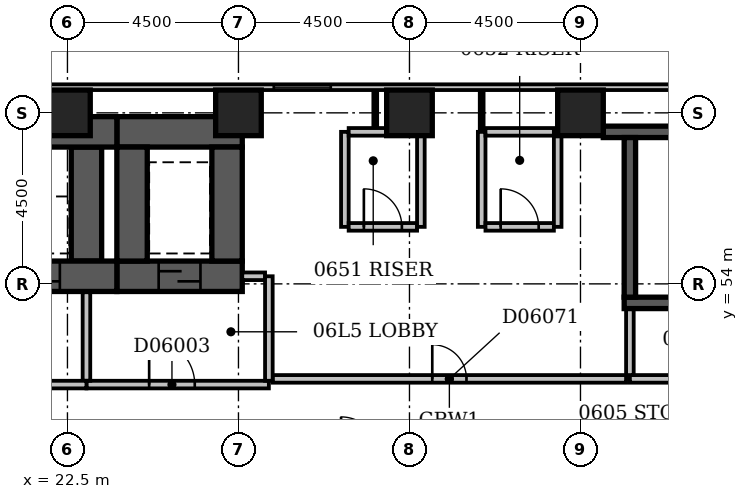
"""IFC4 building model, lengths in metres.
Left out: names, types, materials, properties, quantities, classifications, styles, units other than length and angle.
Written with IfcOpenShell. Run it as: python <this file> out.ifc"""

import sys

from ifc_helpers import new_model, si_unit, direction, frame, frame_2d, origin, origin_2d, place, context, subcontext, project, spatial, rectangle, extrude, element, fill, save


model = new_model("IFC4")
c1 = context("Model", 3, precision=1e-05, world=origin(), true_north=direction((0.0, 1.0)))
c2 = subcontext(c1, "Body", "Model", "MODEL_VIEW")
j1 = project(units=[si_unit("LENGTHUNIT", "METRE"), si_unit("PLANEANGLEUNIT", "RADIAN")], contexts=[c1])
p1 = place(None, origin())
s1 = spatial("IfcSite", under=j1, at=p1, CompositionType="ELEMENT")
p2 = place(p1, origin())
s2 = spatial("IfcBuilding", under=s1, at=p2, CompositionType="ELEMENT")
p3 = place(p2, frame((0.0, 0.0, 32.6)))
s3 = spatial("IfcBuildingStorey", under=s2, at=p3, CompositionType="ELEMENT", Elevation=32.6)
p4 = place(p3, frame((7.35, 54.2, -0.3), z_axis=(0.0, 0.0, 1.0), x_axis=(1.0, 0.0, 0.0)))
e1 = element("IfcWall", 1, at=p4, inside=s3, PredefinedType="SHEAR", context=c2, shape_type="SweptSolid", body=[
    extrude(rectangle(XDim=16.45, YDim=0.8, at=frame_2d((8.225, 0.0))), origin(), (0.0, 0.0, 1.0), 3.6),
])
p5 = place(p4, frame((1.35, 0.0, 0.3)))
e2 = element("IfcOpeningElement", 2, at=p5, cuts=e1, PredefinedType="OPENING", context=c2, shape_type="SweptSolid", body=[
    extrude(rectangle(XDim=1.1, YDim=2.1, at=frame_2d((0.55, 1.05))), frame((0.0, 0.412, 0.0), z_axis=(0.0, -1.0, 0.0), x_axis=(1.0, 0.0, 0.0)), (0.0, 0.0, 1.0), 0.824),
])
p6 = place(p4, frame((3.85, 0.0, 0.3)))
e3 = element("IfcOpeningElement", 3, at=p6, cuts=e1, PredefinedType="OPENING", context=c2, shape_type="SweptSolid", body=[
    extrude(rectangle(XDim=1.1, YDim=2.1, at=frame_2d((0.55, 1.05))), frame((0.0, 0.412, 0.0), z_axis=(0.0, -1.0, 0.0), x_axis=(1.0, 0.0, 0.0)), (0.0, 0.0, 1.0), 0.824),
])
p7 = place(p4, frame((6.35, 0.0, 0.3)))
e4 = element("IfcOpeningElement", 4, at=p7, cuts=e1, PredefinedType="OPENING", context=c2, shape_type="SweptSolid", body=[
    extrude(rectangle(XDim=1.1, YDim=2.1, at=frame_2d((0.55, 1.05))), frame((0.0, 0.412, 0.0), z_axis=(0.0, -1.0, 0.0), x_axis=(1.0, 0.0, 0.0)), (0.0, 0.0, 1.0), 0.824),
])
p8 = place(p4, frame((8.85, 0.0, 0.3)))
e5 = element("IfcOpeningElement", 5, at=p8, cuts=e1, PredefinedType="OPENING", context=c2, shape_type="SweptSolid", body=[
    extrude(rectangle(XDim=1.1, YDim=2.1, at=frame_2d((0.55, 1.05))), frame((0.0, 0.412, 0.0), z_axis=(0.0, -1.0, 0.0), x_axis=(1.0, 0.0, 0.0)), (0.0, 0.0, 1.0), 0.824),
])
p9 = place(p4, frame((11.35, 0.0, 0.3)))
e6 = element("IfcOpeningElement", 6, at=p9, cuts=e1, PredefinedType="OPENING", context=c2, shape_type="SweptSolid", body=[
    extrude(rectangle(XDim=1.1, YDim=2.1, at=frame_2d((0.55, 1.05))), frame((0.0, 0.412, 0.0), z_axis=(0.0, -1.0, 0.0), x_axis=(1.0, 0.0, 0.0)), (0.0, 0.0, 1.0), 0.824),
])
p10 = place(p4, frame((13.85, 0.0, 0.3)))
e7 = element("IfcOpeningElement", 7, at=p10, cuts=e1, PredefinedType="OPENING", context=c2, shape_type="SweptSolid", body=[
    extrude(rectangle(XDim=1.1, YDim=2.1, at=frame_2d((0.55, 1.05))), frame((0.0, 0.412, 0.0), z_axis=(0.0, -1.0, 0.0), x_axis=(1.0, 0.0, 0.0)), (0.0, 0.0, 1.0), 0.824),
])
p11 = place(p3, frame((7.35, 58.0, -0.3), z_axis=(0.0, 0.0, 1.0), x_axis=(1.0, 0.0, 0.0)))
e8 = element("IfcWall", 8, at=p11, inside=s3, PredefinedType="SHEAR", context=c2, shape_type="SweptSolid", body=[
    extrude(rectangle(XDim=16.45, YDim=0.8, at=frame_2d((8.225, 0.0))), origin(), (0.0, 0.0, 1.0), 3.6),
])
p12 = place(p3, frame((23.0, 54.6, -0.3), z_axis=(0.0, 0.0, 1.0), x_axis=(0.0, 1.0, 0.0)))
e9 = element("IfcWall", 9, at=p12, inside=s3, PredefinedType="SHEAR", context=c2, shape_type="SweptSolid", body=[
    extrude(rectangle(XDim=3.0, YDim=0.8, at=frame_2d((1.5, 0.0))), origin(), (0.0, 0.0, 1.0), 3.6),
])
p13 = place(p3, frame((23.8, 54.2, -0.3), z_axis=(0.0, 0.0, 1.0), x_axis=(1.0, 0.0, 0.0)))
e10 = element("IfcWall", 10, at=p13, inside=s3, PredefinedType="SHEAR", context=c2, shape_type="SweptSolid", body=[
    extrude(rectangle(XDim=3.3, YDim=0.8, at=frame_2d((1.65, 0.0))), origin(), (0.0, 0.0, 1.0), 3.6),
])
p14 = place(p13, frame((1.1, 0.0, 0.3)))
e11 = element("IfcOpeningElement", 11, at=p14, cuts=e10, PredefinedType="OPENING", context=c2, shape_type="SweptSolid", body=[
    extrude(rectangle(XDim=1.1, YDim=2.1, at=frame_2d((0.55, 1.05))), frame((0.0, 0.412, 0.0), z_axis=(0.0, -1.0, 0.0), x_axis=(1.0, 0.0, 0.0)), (0.0, 0.0, 1.0), 0.824),
])
p15 = place(p3, frame((23.8, 58.0, -0.3), z_axis=(0.0, 0.0, 1.0), x_axis=(1.0, 0.0, 0.0)))
e12 = element("IfcWall", 12, at=p15, inside=s3, PredefinedType="SHEAR", context=c2, shape_type="SweptSolid", body=[
    extrude(rectangle(XDim=3.3, YDim=0.8, at=frame_2d((1.65, 0.0))), origin(), (0.0, 0.0, 1.0), 3.6),
])
for number, where, z_axis, x_axis in (
    (13, (24.2, 54.6, -0.3), (0.0, 0.0, 1.0), (0.0, 1.0, 0.0)),
    (14, (26.7, 54.6, -0.3), (0.0, 0.0, 1.0), (0.0, 1.0, 0.0)),
):
    element("IfcWall", number, at=place(p3, frame(where, z_axis=z_axis, x_axis=x_axis)), inside=s3, PredefinedType="SHEAR", context=c2, shape_type="SweptSolid", body=[
        extrude(rectangle(XDim=3.0, YDim=0.8, at=frame_2d((1.5, 0.0))), origin(), (0.0, 0.0, 1.0), 3.6),
    ])
p16 = place(p3, frame((36.6, 58.0, -0.3), z_axis=(0.0, 0.0, 1.0), x_axis=(1.0, 0.0, 0.0)))
e15 = element("IfcWall", 15, at=p16, inside=s3, PredefinedType="SHEAR", context=c2, shape_type="SweptSolid", body=[
    extrude(rectangle(XDim=7.8, YDim=0.3, at=frame_2d((3.9, 0.0))), origin(), (0.0, 0.0, 1.0), 3.6),
])
p17 = place(p3, frame((37.15, 53.5, -0.3), z_axis=(0.0, 0.0, 1.0), x_axis=(1.0, 0.0, 0.0)))
e16 = element("IfcWall", 16, at=p17, inside=s3, PredefinedType="SHEAR", context=c2, shape_type="SweptSolid", body=[
    extrude(rectangle(XDim=7.0, YDim=0.3, at=frame_2d((3.5, 0.0))), origin(), (0.0, 0.0, 1.0), 3.6),
])
p18 = place(p17, frame((5.58, 0.0, 0.3)))
e17 = element("IfcOpeningElement", 17, at=p18, cuts=e16, PredefinedType="OPENING", context=c2, shape_type="SweptSolid", body=[
    extrude(rectangle(XDim=1.1, YDim=2.1, at=frame_2d((0.55, 1.05))), frame((0.0, 0.162, 0.0), z_axis=(0.0, -1.0, 0.0), x_axis=(1.0, 0.0, 0.0)), (0.0, 0.0, 1.0), 0.324),
])
p19 = place(p3, frame((37.3, 53.65, -0.3), z_axis=(0.0, 0.0, 1.0), x_axis=(0.0, 1.0, 0.0)))
e18 = element("IfcWall", 18, at=p19, inside=s3, PredefinedType="SHEAR", context=c2, shape_type="SweptSolid", body=[
    extrude(rectangle(XDim=4.2, YDim=0.3, at=frame_2d((2.1, 0.0))), origin(), (0.0, 0.0, 1.0), 3.6),
])
for number, where, z_axis, x_axis in (
    (19, (22.5, 58.5, -0.3), (0.0, 0.0, 1.0), (1.0, 0.0, 0.0)),
    (20, (27.0, 58.5, -0.3), (0.0, 0.0, 1.0), (1.0, 0.0, 0.0)),
    (21, (31.5, 58.5, -0.3), (0.0, 0.0, 1.0), (1.0, 0.0, 0.0)),
    (22, (36.0, 58.5, -0.3), (0.0, 0.0, 1.0), (1.0, 0.0, 0.0)),
):
    element("IfcColumn", number, at=place(p3, frame(where, z_axis=z_axis, x_axis=x_axis)), inside=s3, PredefinedType="COLUMN", context=c2, shape_type="SweptSolid", body=[
        extrude(rectangle(XDim=1.2, YDim=1.2, at=origin_2d()), origin(), (0.0, 0.0, 1.0), 3.6),
    ])
p20 = place(p3, frame((68.1, 59.175, 0.0), z_axis=(0.0, 0.0, 1.0), x_axis=(-1.0, 0.0, 0.0)))
e23 = element("IfcWall", 23, at=p20, inside=s3, PredefinedType="STANDARD", context=c2, shape_type="SweptSolid", body=[
    extrude(rectangle(XDim=68.85, YDim=0.15, at=frame_2d((34.425, 0.0))), origin(), (0.0, 0.0, 1.0), 2.7),
])
p21 = place(p20, frame((1.65, 0.0, 0.6)))
e24 = element("IfcOpeningElement", 24, at=p21, cuts=e23, PredefinedType="OPENING", context=c2, shape_type="SweptSolid", body=[
    extrude(rectangle(XDim=2.4, YDim=1.8, at=frame_2d((1.2, 0.9))), frame((0.0, 0.087, 0.0), z_axis=(0.0, -1.0, 0.0), x_axis=(1.0, 0.0, 0.0)), (0.0, 0.0, 1.0), 0.174),
])
p22 = place(p20, frame((6.15, 0.0, 0.6)))
e25 = element("IfcOpeningElement", 25, at=p22, cuts=e23, PredefinedType="OPENING", context=c2, shape_type="SweptSolid", body=[
    extrude(rectangle(XDim=2.4, YDim=1.8, at=frame_2d((1.2, 0.9))), frame((0.0, 0.087, 0.0), z_axis=(0.0, -1.0, 0.0), x_axis=(1.0, 0.0, 0.0)), (0.0, 0.0, 1.0), 0.174),
])
p23 = place(p20, frame((38.67, 0.0, 0.6)))
e26 = element("IfcOpeningElement", 26, at=p23, cuts=e23, PredefinedType="OPENING", context=c2, shape_type="SweptSolid", body=[
    extrude(rectangle(XDim=1.5, YDim=1.8, at=frame_2d((0.75, 0.9))), frame((0.0, 0.087, 0.0), z_axis=(0.0, -1.0, 0.0), x_axis=(1.0, 0.0, 0.0)), (0.0, 0.0, 1.0), 0.174),
])
p24 = place(p3, frame((8.0, 51.35, 0.0), z_axis=(0.0, 0.0, 1.0), x_axis=(1.0, 0.0, 0.0)))
e27 = element("IfcWall", 27, at=p24, inside=s3, PredefinedType="PARTITIONING", context=c2, shape_type="SweptSolid", body=[
    extrude(rectangle(XDim=15.0, YDim=0.2, at=frame_2d((7.5, 0.0))), origin(), (0.0, 0.0, 1.0), 3.3),
])
p25 = place(p24, frame((3.4, 0.0, 0.0)))
e28 = element("IfcOpeningElement", 28, at=p25, cuts=e27, PredefinedType="OPENING", context=c2, shape_type="SweptSolid", body=[
    extrude(rectangle(XDim=1.2, YDim=2.1, at=frame_2d((0.6, 1.05))), frame((0.0, 0.112, 0.0), z_axis=(0.0, -1.0, 0.0), x_axis=(1.0, 0.0, 0.0)), (0.0, 0.0, 1.0), 0.224),
])
p26 = place(p24, frame((9.4, 0.0, 0.0)))
e29 = element("IfcOpeningElement", 29, at=p26, cuts=e27, PredefinedType="OPENING", context=c2, shape_type="SweptSolid", body=[
    extrude(rectangle(XDim=1.2, YDim=2.1, at=frame_2d((0.6, 1.05))), frame((0.0, 0.112, 0.0), z_axis=(0.0, -1.0, 0.0), x_axis=(1.0, 0.0, 0.0)), (0.0, 0.0, 1.0), 0.224),
])
p27 = place(p3, frame((23.0, 51.45, 0.0), z_axis=(0.0, 0.0, 1.0), x_axis=(0.0, 1.0, 0.0)))
e30 = element("IfcWall", 30, at=p27, inside=s3, PredefinedType="PARTITIONING", context=c2, shape_type="SweptSolid", body=[
    extrude(rectangle(XDim=2.33, YDim=0.2, at=frame_2d((1.165, 0.0))), origin(), (0.0, 0.0, 1.0), 3.3),
])
p28 = place(p3, frame((23.0, 51.35, 0.0), z_axis=(0.0, 0.0, 1.0), x_axis=(1.0, 0.0, 0.0)))
e31 = element("IfcWall", 31, at=p28, inside=s3, PredefinedType="PARTITIONING", context=c2, shape_type="SweptSolid", body=[
    extrude(rectangle(XDim=4.8, YDim=0.2, at=frame_2d((2.4, 0.0))), origin(), (0.0, 0.0, 1.0), 3.3),
])
p29 = place(p28, frame((1.65, 0.0, 0.0)))
e32 = element("IfcOpeningElement", 32, at=p29, cuts=e31, PredefinedType="OPENING", context=c2, shape_type="SweptSolid", body=[
    extrude(rectangle(XDim=1.2, YDim=2.1, at=frame_2d((0.6, 1.05))), frame((0.0, 0.112, 0.0), z_axis=(0.0, -1.0, 0.0), x_axis=(1.0, 0.0, 0.0)), (0.0, 0.0, 1.0), 0.224),
])
p30 = place(p3, frame((27.8, 51.45, 0.0), z_axis=(0.0, 0.0, 1.0), x_axis=(0.0, 1.0, 0.0)))
e33 = element("IfcWall", 33, at=p30, inside=s3, PredefinedType="PARTITIONING", context=c2, shape_type="SweptSolid", body=[
    extrude(rectangle(XDim=2.75, YDim=0.2, at=frame_2d((1.375, 0.0))), origin(), (0.0, 0.0, 1.0), 3.3),
])
p31 = place(p3, frame((27.1, 54.2, 0.0), z_axis=(0.0, 0.0, 1.0), x_axis=(1.0, 0.0, 0.0)))
e34 = element("IfcWall", 34, at=p31, inside=s3, PredefinedType="PARTITIONING", context=c2, shape_type="SweptSolid", body=[
    extrude(rectangle(XDim=0.6, YDim=0.2, at=frame_2d((0.3, 0.0))), origin(), (0.0, 0.0, 1.0), 3.3),
])
p32 = place(p3, frame((37.3, 51.5, 0.0), z_axis=(0.0, 0.0, 1.0), x_axis=(1.0, 0.0, 0.0)))
e35 = element("IfcWall", 35, at=p32, inside=s3, PredefinedType="PARTITIONING", context=c2, shape_type="SweptSolid", body=[
    extrude(rectangle(XDim=6.7, YDim=0.2, at=frame_2d((3.35, 0.0))), origin(), (0.0, 0.0, 1.0), 3.3),
])
p33 = place(p32, frame((2.75, 0.0, 0.0)))
e36 = element("IfcOpeningElement", 36, at=p33, cuts=e35, PredefinedType="OPENING", context=c2, shape_type="SweptSolid", body=[
    extrude(rectangle(XDim=1.2, YDim=2.1, at=frame_2d((0.6, 1.05))), frame((0.0, 0.112, 0.0), z_axis=(0.0, -1.0, 0.0), x_axis=(1.0, 0.0, 0.0)), (0.0, 0.0, 1.0), 0.224),
])
p34 = place(p3, frame((37.3, 51.6, 0.0), z_axis=(0.0, 0.0, 1.0), x_axis=(0.0, 1.0, 0.0)))
e37 = element("IfcWall", 37, at=p34, inside=s3, PredefinedType="PARTITIONING", context=c2, shape_type="SweptSolid", body=[
    extrude(rectangle(XDim=1.73, YDim=0.2, at=frame_2d((0.865, 0.0))), origin(), (0.0, 0.0, 1.0), 3.3),
])
p35 = place(p3, frame((27.9, 51.5, 0.0), z_axis=(0.0, 0.0, 1.0), x_axis=(1.0, 0.0, 0.0)))
e38 = element("IfcWall", 38, at=p35, inside=s3, PredefinedType="PARTITIONING", context=c2, shape_type="SweptSolid", body=[
    extrude(rectangle(XDim=9.3, YDim=0.2, at=frame_2d((4.65, 0.0))), origin(), (0.0, 0.0, 1.0), 3.3),
])
p36 = place(p35, frame((4.2, 0.0, 0.0)))
e39 = element("IfcOpeningElement", 39, at=p36, cuts=e38, PredefinedType="OPENING", context=c2, shape_type="SweptSolid", body=[
    extrude(rectangle(XDim=0.9, YDim=2.1, at=frame_2d((0.45, 1.05))), frame((0.0, 0.112, 0.0), z_axis=(0.0, -1.0, 0.0), x_axis=(1.0, 0.0, 0.0)), (0.0, 0.0, 1.0), 0.224),
])
p37 = place(p3, frame((29.8, 55.5, 0.0), z_axis=(0.0, 0.0, 1.0), x_axis=(0.0, 1.0, 0.0)))
e40 = element("IfcWall", 40, at=p37, inside=s3, PredefinedType="PARTITIONING", context=c2, shape_type="SweptSolid", body=[
    extrude(rectangle(XDim=2.5, YDim=0.2, at=frame_2d((1.25, 0.0))), origin(), (0.0, 0.0, 1.0), 3.3),
])
p38 = place(p3, frame((29.9, 55.5, 0.0), z_axis=(0.0, 0.0, 1.0), x_axis=(1.0, 0.0, 0.0)))
e41 = element("IfcWall", 41, at=p38, inside=s3, PredefinedType="PARTITIONING", context=c2, shape_type="SweptSolid", body=[
    extrude(rectangle(XDim=1.8, YDim=0.2, at=frame_2d((0.9, 0.0))), origin(), (0.0, 0.0, 1.0), 3.3),
])
p39 = place(p38, frame((0.4, 0.0, 0.0)))
e42 = element("IfcOpeningElement", 42, at=p39, cuts=e41, PredefinedType="OPENING", context=c2, shape_type="SweptSolid", body=[
    extrude(rectangle(XDim=1.0, YDim=2.1, at=frame_2d((0.5, 1.05))), frame((0.0, 0.112, 0.0), z_axis=(0.0, -1.0, 0.0), x_axis=(1.0, 0.0, 0.0)), (0.0, 0.0, 1.0), 0.224),
])
for number, where, z_axis, x_axis in (
    (43, (31.8, 55.5, 0.0), (0.0, 0.0, 1.0), (0.0, 1.0, 0.0)),
    (44, (33.4, 55.5, 0.0), (0.0, 0.0, 1.0), (0.0, 1.0, 0.0)),
):
    element("IfcWall", number, at=place(p3, frame(where, z_axis=z_axis, x_axis=x_axis)), inside=s3, PredefinedType="PARTITIONING", context=c2, shape_type="SweptSolid", body=[
        extrude(rectangle(XDim=2.5, YDim=0.2, at=frame_2d((1.25, 0.0))), origin(), (0.0, 0.0, 1.0), 3.3),
    ])
p40 = place(p3, frame((33.5, 55.5, 0.0), z_axis=(0.0, 0.0, 1.0), x_axis=(1.0, 0.0, 0.0)))
e45 = element("IfcWall", 45, at=p40, inside=s3, PredefinedType="PARTITIONING", context=c2, shape_type="SweptSolid", body=[
    extrude(rectangle(XDim=1.8, YDim=0.2, at=frame_2d((0.9, 0.0))), origin(), (0.0, 0.0, 1.0), 3.3),
])
p41 = place(p40, frame((0.4, 0.0, 0.0)))
e46 = element("IfcOpeningElement", 46, at=p41, cuts=e45, PredefinedType="OPENING", context=c2, shape_type="SweptSolid", body=[
    extrude(rectangle(XDim=1.0, YDim=2.1, at=frame_2d((0.5, 1.05))), frame((0.0, 0.112, 0.0), z_axis=(0.0, -1.0, 0.0), x_axis=(1.0, 0.0, 0.0)), (0.0, 0.0, 1.0), 0.224),
])
p42 = place(p3, frame((35.4, 55.5, 0.0), z_axis=(0.0, 0.0, 1.0), x_axis=(0.0, 1.0, 0.0)))
e47 = element("IfcWall", 47, at=p42, inside=s3, PredefinedType="PARTITIONING", context=c2, shape_type="SweptSolid", body=[
    extrude(rectangle(XDim=2.5, YDim=0.2, at=frame_2d((1.25, 0.0))), origin(), (0.0, 0.0, 1.0), 2.4),
])
p43 = place(p3, frame((29.9, 58.0, 0.0), z_axis=(0.0, 0.0, 1.0), x_axis=(1.0, 0.0, 0.0)))
e48 = element("IfcWall", 48, at=p43, inside=s3, PredefinedType="PARTITIONING", context=c2, shape_type="SweptSolid", body=[
    extrude(rectangle(XDim=1.8, YDim=0.2, at=frame_2d((0.9, 0.0))), origin(), (0.0, 0.0, 1.0), 3.3),
])
p44 = place(p3, frame((33.4, 58.0, 0.0), z_axis=(0.0, 0.0, 1.0), x_axis=(0.0, 1.0, 0.0)))
e49 = element("IfcWall", 49, at=p44, inside=s3, PredefinedType="PARTITIONING", context=c2, shape_type="SweptSolid", body=[
    extrude(rectangle(XDim=1.1, YDim=0.1, at=frame_2d((0.55, 0.0))), origin(), (0.0, 0.0, 1.0), 3.3),
])
p45 = place(p3, frame((33.5, 58.0, 0.0), z_axis=(0.0, 0.0, 1.0), x_axis=(1.0, 0.0, 0.0)))
e50 = element("IfcWall", 50, at=p45, inside=s3, PredefinedType="PARTITIONING", context=c2, shape_type="SweptSolid", body=[
    extrude(rectangle(XDim=1.8, YDim=0.2, at=frame_2d((0.9, 0.0))), origin(), (0.0, 0.0, 1.0), 3.3),
])
p46 = place(p3, frame((30.6, 58.1, 0.0), z_axis=(0.0, 0.0, 1.0), x_axis=(0.0, 1.0, 0.0)))
e51 = element("IfcWall", 51, at=p46, inside=s3, PredefinedType="PARTITIONING", context=c2, shape_type="SweptSolid", body=[
    extrude(rectangle(XDim=1.0, YDim=0.1, at=frame_2d((0.5, 0.0))), origin(), (0.0, 0.0, 1.0), 3.3),
])
p47 = place(p23, origin())
e52 = element("IfcWindow", 52, at=p47, inside=s3, PartitioningType="SINGLE_PANEL", PredefinedType="WINDOW", context=c2, shape_type="SweptSolid", body=[
    extrude(rectangle(XDim=1.5, YDim=1.8, at=frame_2d((0.75, 0.9))), frame((0.0, 0.03, 0.0), z_axis=(0.0, -1.0, 0.0), x_axis=(1.0, 0.0, 0.0)), (0.0, 0.0, 1.0), 0.06),
])
fill(e26, e52)
p48 = place(p29, origin())
e53 = element("IfcDoor", 53, at=p48, inside=s3, OperationType="SINGLE_SWING_LEFT", PredefinedType="DOOR", context=c2, shape_type="SweptSolid", body=[
    extrude(rectangle(XDim=1.2, YDim=2.1, at=frame_2d((0.6, 1.05))), frame((0.0, 0.025, 0.0), z_axis=(0.0, -1.0, 0.0), x_axis=(1.0, 0.0, 0.0)), (0.0, 0.0, 1.0), 0.05),
])
fill(e32, e53)
p49 = place(p14, origin())
e54 = element("IfcDoor", 54, at=p49, inside=s3, OperationType="SLIDING_TO_LEFT", PredefinedType="DOOR", context=c2, shape_type="SweptSolid", body=[
    extrude(rectangle(XDim=1.1, YDim=2.1, at=frame_2d((0.55, 1.05))), frame((0.0, 0.025, 0.0), z_axis=(0.0, -1.0, 0.0), x_axis=(1.0, 0.0, 0.0)), (0.0, 0.0, 1.0), 0.05),
])
fill(e11, e54)
p50 = place(p10, origin())
e55 = element("IfcDoor", 55, at=p50, inside=s3, OperationType="SLIDING_TO_LEFT", PredefinedType="DOOR", context=c2, shape_type="SweptSolid", body=[
    extrude(rectangle(XDim=1.1, YDim=2.1, at=frame_2d((0.55, 1.05))), frame((0.0, 0.025, 0.0), z_axis=(0.0, -1.0, 0.0), x_axis=(1.0, 0.0, 0.0)), (0.0, 0.0, 1.0), 0.05),
])
fill(e7, e55)
p51 = place(p36, origin())
e56 = element("IfcDoor", 56, at=p51, inside=s3, OperationType="SINGLE_SWING_LEFT", PredefinedType="DOOR", context=c2, shape_type="SweptSolid", body=[
    extrude(rectangle(XDim=0.9, YDim=2.1, at=frame_2d((0.45, 1.05))), frame((0.0, 0.025, 0.0), z_axis=(0.0, -1.0, 0.0), x_axis=(1.0, 0.0, 0.0)), (0.0, 0.0, 1.0), 0.05),
])
fill(e39, e56)
p52 = place(p39, origin())
e57 = element("IfcDoor", 57, at=p52, inside=s3, OperationType="SINGLE_SWING_LEFT", PredefinedType="DOOR", context=c2, shape_type="SweptSolid", body=[
    extrude(rectangle(XDim=1.0, YDim=2.1, at=frame_2d((0.5, 1.05))), frame((0.0, 0.025, 0.0), z_axis=(0.0, -1.0, 0.0), x_axis=(1.0, 0.0, 0.0)), (0.0, 0.0, 1.0), 0.05),
])
fill(e42, e57)
p53 = place(p41, origin())
e58 = element("IfcDoor", 58, at=p53, inside=s3, OperationType="SINGLE_SWING_LEFT", PredefinedType="DOOR", context=c2, shape_type="SweptSolid", body=[
    extrude(rectangle(XDim=1.0, YDim=2.1, at=frame_2d((0.5, 1.05))), frame((0.0, 0.025, 0.0), z_axis=(0.0, -1.0, 0.0), x_axis=(1.0, 0.0, 0.0)), (0.0, 0.0, 1.0), 0.05),
])
fill(e46, e58)
save(model, sys.argv[1])
